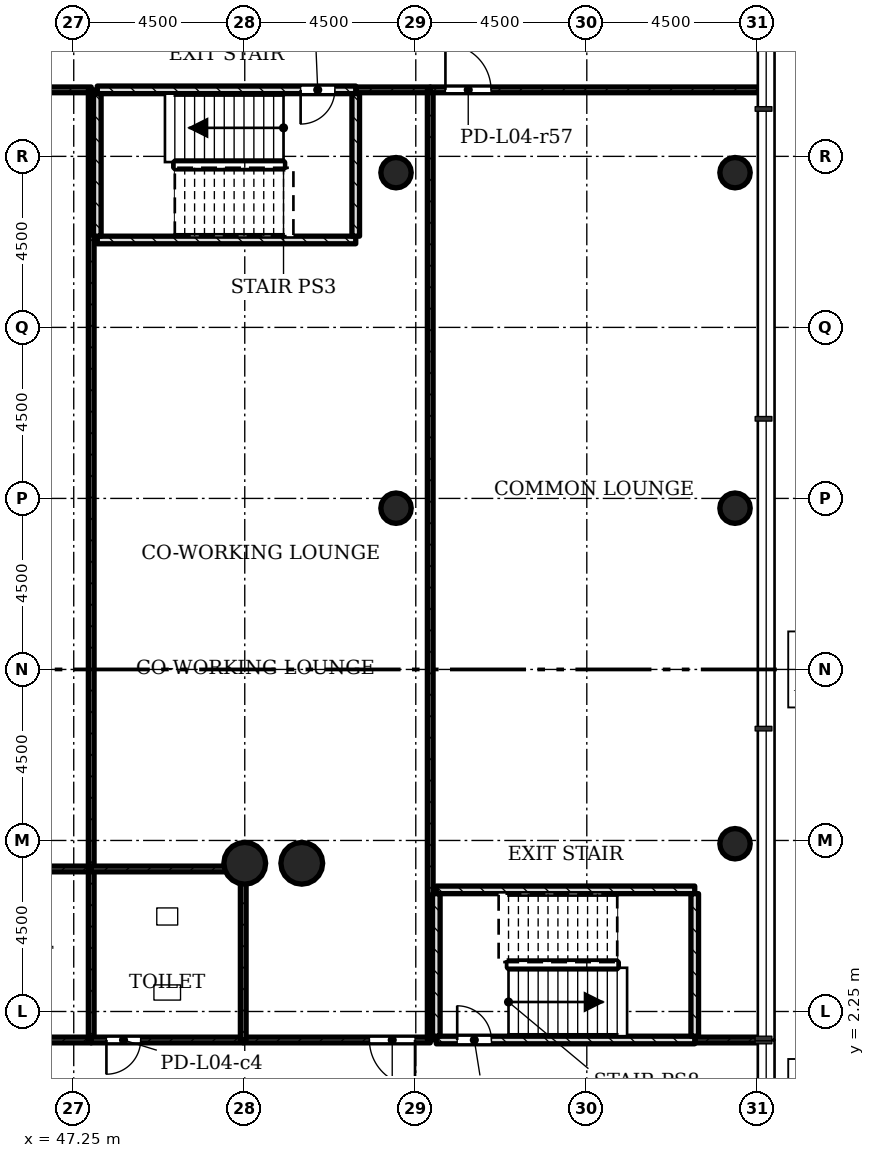
"""IFC4 building model, lengths in metres.
Left out: names, types, materials, properties, quantities, classifications, styles, units other than length and angle.
Written with IfcOpenShell. Run it as: python <this file> out.ifc"""

import sys

from ifc_helpers import new_model, si_unit, direction, frame, frame_2d, origin, origin_2d, place, context, subcontext, project, spatial, rectangle, hollow_circle, extrude, element, fill, save


model = new_model("IFC4")
c1 = context("Model", 3, precision=1e-05, world=origin(), true_north=direction((0.0, 1.0)))
c2 = subcontext(c1, "Body", "Model", "MODEL_VIEW")
j1 = project(units=[si_unit("LENGTHUNIT", "METRE"), si_unit("PLANEANGLEUNIT", "RADIAN")], contexts=[c1])
p1 = place(None, origin())
s1 = spatial("IfcSite", under=j1, at=p1, CompositionType="ELEMENT")
p2 = place(p1, origin())
s2 = spatial("IfcBuilding", under=s1, at=p2, CompositionType="ELEMENT")
p3 = place(p2, frame((0.0, 0.0, 20.0)))
s3 = spatial("IfcBuildingStorey", under=s2, at=p3, CompositionType="ELEMENT", Elevation=20.0)
for number, where, z_axis, x_axis in (
    (1, (51.75, 6.15, 0.0), (0.0, 0.0, 1.0), (1.0, 0.0, 0.0)),
    (2, (53.25, 6.15, 0.0), (0.0, 0.0, 1.0), (1.0, 0.0, 0.0)),
):
    element("IfcColumn", number, at=place(p3, frame(where, z_axis=z_axis, x_axis=x_axis)), inside=s3, PredefinedType="COLUMN", context=c2, shape_type="SweptSolid", body=[
        extrude(hollow_circle(Radius=0.55, WallThickness=0.04, at=origin_2d()), origin(), (0.0, 0.0, 1.0), 4.5),
    ])
for number, where, z_axis, x_axis in (
    (3, (64.65, 6.664, 0.0), (0.0, 0.0, 1.0), (1.0, 0.0, 0.0)),
    (4, (55.73, 15.493, 0.0), (0.0, 0.0, 1.0), (1.0, 0.0, 0.0)),
    (5, (64.65, 15.493, 0.0), (0.0, 0.0, 1.0), (1.0, 0.0, 0.0)),
    (6, (55.73, 24.321, 0.0), (0.0, 0.0, 1.0), (1.0, 0.0, 0.0)),
    (7, (64.65, 24.321, 0.0), (0.0, 0.0, 1.0), (1.0, 0.0, 0.0)),
):
    element("IfcColumn", number, at=place(p3, frame(where, z_axis=z_axis, x_axis=x_axis)), inside=s3, PredefinedType="COLUMN", context=c2, shape_type="SweptSolid", body=[
        extrude(hollow_circle(Radius=0.4, WallThickness=0.028, at=origin_2d()), origin(), (0.0, 0.0, 1.0), 4.08),
    ])
p4 = place(p3, frame((38.79, 26.5, 0.0), z_axis=(0.0, 0.0, 1.0), x_axis=(1.0, 0.0, 0.0)))
e8 = element("IfcWall", 8, at=p4, inside=s3, PredefinedType="PARTITIONING", context=c2, shape_type="SweptSolid", body=[
    extrude(rectangle(XDim=8.92, YDim=0.15, at=frame_2d((4.46, 0.0))), origin(), (0.0, 0.0, 1.0), 4.075),
])
p5 = place(p4, frame((0.4, 0.0, 0.0)))
e9 = element("IfcOpeningElement", 9, at=p5, cuts=e8, PredefinedType="OPENING", context=c2, shape_type="SweptSolid", body=[
    extrude(rectangle(XDim=1.2, YDim=2.1, at=frame_2d((0.6, 1.05))), frame((0.0, 0.085, 0.0), z_axis=(0.0, -1.0, 0.0), x_axis=(1.0, 0.0, 0.0)), (0.0, 0.0, 1.0), 0.17),
])
p6 = place(p3, frame((47.71, 26.5, 0.0), z_axis=(0.0, 0.0, 1.0), x_axis=(0.0, -1.0, 0.0)))
e10 = element("IfcWall", 10, at=p6, inside=s3, PredefinedType="PARTITIONING", context=c2, shape_type="SweptSolid", body=[
    extrude(rectangle(XDim=20.5, YDim=0.15, at=frame_2d((10.25, 0.0))), origin(), (0.0, 0.0, 1.0), 4.075),
])
p7 = place(p3, frame((54.67, 26.5, 0.0), z_axis=(0.0, 0.0, 1.0), x_axis=(1.0, 0.0, 0.0)))
e11 = element("IfcWall", 11, at=p7, inside=s3, PredefinedType="PARTITIONING", context=c2, shape_type="SweptSolid", body=[
    extrude(rectangle(XDim=1.96, YDim=0.15, at=frame_2d((0.98, 0.0))), origin(), (0.0, 0.0, 1.0), 4.075),
])
p8 = place(p3, frame((56.63, 1.5, 0.0), z_axis=(0.0, 0.0, 1.0), x_axis=(-1.0, 0.0, 0.0)))
e12 = element("IfcWall", 12, at=p8, inside=s3, PredefinedType="PARTITIONING", context=c2, shape_type="SweptSolid", body=[
    extrude(rectangle(XDim=4.92, YDim=0.15, at=frame_2d((2.46, 0.0))), origin(), (0.0, 0.0, 1.0), 4.075),
])
p9 = place(p8, frame((0.4, 0.0, 0.0)))
e13 = element("IfcOpeningElement", 13, at=p9, cuts=e12, PredefinedType="OPENING", context=c2, shape_type="SweptSolid", body=[
    extrude(rectangle(XDim=1.2, YDim=2.1, at=frame_2d((0.6, 1.05))), frame((0.0, 0.085, 0.0), z_axis=(0.0, -1.0, 0.0), x_axis=(1.0, 0.0, 0.0)), (0.0, 0.0, 1.0), 0.17),
])
p10 = place(p3, frame((56.63, 26.5, 0.0), z_axis=(0.0, 0.0, 1.0), x_axis=(0.0, -1.0, 0.0)))
e14 = element("IfcWall", 14, at=p10, inside=s3, PredefinedType="PARTITIONING", context=c2, shape_type="SweptSolid", body=[
    extrude(rectangle(XDim=25.0, YDim=0.15, at=frame_2d((12.5, 0.0))), origin(), (0.0, 0.0, 1.0), 4.075),
])
p11 = place(p3, frame((56.63, 26.5, 0.0), z_axis=(0.0, 0.0, 1.0), x_axis=(1.0, 0.0, 0.0)))
e15 = element("IfcWall", 15, at=p11, inside=s3, PredefinedType="PARTITIONING", context=c2, shape_type="SweptSolid", body=[
    extrude(rectangle(XDim=8.72, YDim=0.15, at=frame_2d((4.36, 0.0))), origin(), (0.0, 0.0, 1.0), 4.075),
])
p12 = place(p11, frame((0.4, 0.0, 0.0)))
e16 = element("IfcOpeningElement", 16, at=p12, cuts=e15, PredefinedType="OPENING", context=c2, shape_type="SweptSolid", body=[
    extrude(rectangle(XDim=1.2, YDim=2.1, at=frame_2d((0.6, 1.05))), frame((0.0, 0.085, 0.0), z_axis=(0.0, -1.0, 0.0), x_axis=(1.0, 0.0, 0.0)), (0.0, 0.0, 1.0), 0.17),
])
p13 = place(p3, frame((65.35, 1.5, 0.0), z_axis=(0.0, 0.0, 1.0), x_axis=(-1.0, 0.0, 0.0)))
e17 = element("IfcWall", 17, at=p13, inside=s3, PredefinedType="PARTITIONING", context=c2, shape_type="SweptSolid", body=[
    extrude(rectangle(XDim=1.76, YDim=0.15, at=frame_2d((0.88, 0.0))), origin(), (0.0, 0.0, 1.0), 4.075),
])
p14 = place(p3, frame((43.71, 1.5, 0.0), z_axis=(0.0, 0.0, 1.0), x_axis=(1.0, 0.0, 0.0)))
e18 = element("IfcWall", 18, at=p14, inside=s3, PredefinedType="PARTITIONING", context=c2, shape_type="SweptSolid", body=[
    extrude(rectangle(XDim=4.0, YDim=0.15, at=frame_2d((2.0, 0.0))), origin(), (0.0, 0.0, 1.0), 4.075),
])
p15 = place(p14, frame((0.4, 0.0, 0.0)))
e19 = element("IfcOpeningElement", 19, at=p15, cuts=e18, PredefinedType="OPENING", context=c2, shape_type="SweptSolid", body=[
    extrude(rectangle(XDim=0.9, YDim=2.1, at=frame_2d((0.45, 1.05))), frame((0.0, 0.085, 0.0), z_axis=(0.0, -1.0, 0.0), x_axis=(1.0, 0.0, 0.0)), (0.0, 0.0, 1.0), 0.17),
])
p16 = place(p3, frame((47.71, 6.0, 0.0), z_axis=(0.0, 0.0, 1.0), x_axis=(-1.0, 0.0, 0.0)))
e20 = element("IfcWall", 20, at=p16, inside=s3, PredefinedType="PARTITIONING", context=c2, shape_type="SweptSolid", body=[
    extrude(rectangle(XDim=4.0, YDim=0.15, at=frame_2d((2.0, 0.0))), origin(), (0.0, 0.0, 1.0), 4.075),
])
p17 = place(p3, frame((47.71, 1.5, 0.0), z_axis=(0.0, 0.0, 1.0), x_axis=(0.0, 1.0, 0.0)))
e21 = element("IfcWall", 21, at=p17, inside=s3, PredefinedType="PARTITIONING", context=c2, shape_type="SweptSolid", body=[
    extrude(rectangle(XDim=4.5, YDim=0.15, at=frame_2d((2.25, 0.0))), origin(), (0.0, 0.0, 1.0), 4.075),
])
p18 = place(p3, frame((47.71, 1.5, 0.0), z_axis=(0.0, 0.0, 1.0), x_axis=(1.0, 0.0, 0.0)))
e22 = element("IfcWall", 22, at=p18, inside=s3, PredefinedType="PARTITIONING", context=c2, shape_type="SweptSolid", body=[
    extrude(rectangle(XDim=4.0, YDim=0.15, at=frame_2d((2.0, 0.0))), origin(), (0.0, 0.0, 1.0), 4.075),
])
p19 = place(p18, frame((0.4, 0.0, 0.0)))
e23 = element("IfcOpeningElement", 23, at=p19, cuts=e22, PredefinedType="OPENING", context=c2, shape_type="SweptSolid", body=[
    extrude(rectangle(XDim=0.9, YDim=2.1, at=frame_2d((0.45, 1.05))), frame((0.0, 0.085, 0.0), z_axis=(0.0, -1.0, 0.0), x_axis=(1.0, 0.0, 0.0)), (0.0, 0.0, 1.0), 0.17),
])
p20 = place(p3, frame((51.71, 1.5, 0.0), z_axis=(0.0, 0.0, 1.0), x_axis=(0.0, 1.0, 0.0)))
e24 = element("IfcWall", 24, at=p20, inside=s3, PredefinedType="PARTITIONING", context=c2, shape_type="SweptSolid", body=[
    extrude(rectangle(XDim=4.5, YDim=0.15, at=frame_2d((2.25, 0.0))), origin(), (0.0, 0.0, 1.0), 4.075),
])
p21 = place(p3, frame((51.71, 6.0, 0.0), z_axis=(0.0, 0.0, 1.0), x_axis=(-1.0, 0.0, 0.0)))
e25 = element("IfcWall", 25, at=p21, inside=s3, PredefinedType="PARTITIONING", context=c2, shape_type="SweptSolid", body=[
    extrude(rectangle(XDim=4.0, YDim=0.15, at=frame_2d((2.0, 0.0))), origin(), (0.0, 0.0, 1.0), 4.075),
])
p22 = place(p3, frame((47.87, 26.5, 0.0), z_axis=(0.0, 0.0, 1.0), x_axis=(1.0, 0.0, 0.0)))
e26 = element("IfcWall", 26, at=p22, inside=s3, PredefinedType="SHEAR", context=c2, shape_type="SweptSolid", body=[
    extrude(rectangle(XDim=6.8, YDim=0.2, at=frame_2d((3.4, 0.0))), origin(), (0.0, 0.0, 1.0), 4.075),
])
p23 = place(p22, frame((5.35, 0.0, 0.0)))
e27 = element("IfcOpeningElement", 27, at=p23, cuts=e26, PredefinedType="OPENING", context=c2, shape_type="SweptSolid", body=[
    extrude(rectangle(XDim=0.9, YDim=2.1, at=frame_2d((0.45, 1.05))), frame((0.0, 0.11, 0.0), z_axis=(0.0, -1.0, 0.0), x_axis=(1.0, 0.0, 0.0)), (0.0, 0.0, 1.0), 0.22),
])
p24 = place(p3, frame((47.87, 22.55, 0.0), z_axis=(0.0, 0.0, 1.0), x_axis=(1.0, 0.0, 0.0)))
e28 = element("IfcWall", 28, at=p24, inside=s3, PredefinedType="SHEAR", context=c2, shape_type="SweptSolid", body=[
    extrude(rectangle(XDim=6.8, YDim=0.2, at=frame_2d((3.4, 0.0))), origin(), (0.0, 0.0, 1.0), 4.075),
])
for number, where, z_axis, x_axis in (
    (29, (47.87, 22.65, 0.0), (0.0, 0.0, 1.0), (0.0, 1.0, 0.0)),
    (30, (54.67, 22.65, 0.0), (0.0, 0.0, 1.0), (0.0, 1.0, 0.0)),
):
    element("IfcWall", number, at=place(p3, frame(where, z_axis=z_axis, x_axis=x_axis)), inside=s3, PredefinedType="SHEAR", context=c2, shape_type="SweptSolid", body=[
        extrude(rectangle(XDim=3.75, YDim=0.2, at=frame_2d((1.875, 0.0))), origin(), (0.0, 0.0, 1.0), 4.075),
    ])
p25 = place(p3, frame((56.79, 1.5, 0.0), z_axis=(0.0, 0.0, 1.0), x_axis=(1.0, 0.0, 0.0)))
e31 = element("IfcWall", 31, at=p25, inside=s3, PredefinedType="SHEAR", context=c2, shape_type="SweptSolid", body=[
    extrude(rectangle(XDim=6.8, YDim=0.2, at=frame_2d((3.4, 0.0))), origin(), (0.0, 0.0, 1.0), 4.075),
])
p26 = place(p25, frame((0.55, 0.0, 0.0)))
e32 = element("IfcOpeningElement", 32, at=p26, cuts=e31, PredefinedType="OPENING", context=c2, shape_type="SweptSolid", body=[
    extrude(rectangle(XDim=0.9, YDim=2.1, at=frame_2d((0.45, 1.05))), frame((0.0, 0.11, 0.0), z_axis=(0.0, -1.0, 0.0), x_axis=(1.0, 0.0, 0.0)), (0.0, 0.0, 1.0), 0.22),
])
p27 = place(p3, frame((56.79, 5.45, 0.0), z_axis=(0.0, 0.0, 1.0), x_axis=(1.0, 0.0, 0.0)))
e33 = element("IfcWall", 33, at=p27, inside=s3, PredefinedType="SHEAR", context=c2, shape_type="SweptSolid", body=[
    extrude(rectangle(XDim=6.8, YDim=0.2, at=frame_2d((3.4, 0.0))), origin(), (0.0, 0.0, 1.0), 4.075),
])
for number, where, z_axis, x_axis in (
    (34, (56.79, 1.6, 0.0), (0.0, 0.0, 1.0), (0.0, 1.0, 0.0)),
    (35, (63.59, 1.6, 0.0), (0.0, 0.0, 1.0), (0.0, 1.0, 0.0)),
):
    element("IfcWall", number, at=place(p3, frame(where, z_axis=z_axis, x_axis=x_axis)), inside=s3, PredefinedType="SHEAR", context=c2, shape_type="SweptSolid", body=[
        extrude(rectangle(XDim=3.75, YDim=0.2, at=frame_2d((1.875, 0.0))), origin(), (0.0, 0.0, 1.0), 4.075),
    ])
p28 = place(p9, origin())
e36 = element("IfcDoor", 36, at=p28, inside=s3, OperationType="SINGLE_SWING_RIGHT", PredefinedType="DOOR", context=c2, shape_type="SweptSolid", body=[
    extrude(rectangle(XDim=1.2, YDim=2.1, at=frame_2d((0.6, 1.05))), frame((0.0, 0.025, 0.0), z_axis=(0.0, -1.0, 0.0), x_axis=(1.0, 0.0, 0.0)), (0.0, 0.0, 1.0), 0.05),
])
fill(e13, e36)
p29 = place(p12, origin())
e37 = element("IfcDoor", 37, at=p29, inside=s3, OperationType="SINGLE_SWING_RIGHT", PredefinedType="DOOR", context=c2, shape_type="SweptSolid", body=[
    extrude(rectangle(XDim=1.2, YDim=2.1, at=frame_2d((0.6, 1.05))), frame((0.0, 0.025, 0.0), z_axis=(0.0, -1.0, 0.0), x_axis=(1.0, 0.0, 0.0)), (0.0, 0.0, 1.0), 0.05),
])
fill(e16, e37)
p30 = place(p19, origin())
e38 = element("IfcDoor", 38, at=p30, inside=s3, OperationType="SINGLE_SWING_LEFT", PredefinedType="DOOR", context=c2, shape_type="SweptSolid", body=[
    extrude(rectangle(XDim=0.9, YDim=2.1, at=frame_2d((0.45, 1.05))), frame((0.0, 0.025, 0.0), z_axis=(0.0, -1.0, 0.0), x_axis=(1.0, 0.0, 0.0)), (0.0, 0.0, 1.0), 0.05),
])
fill(e23, e38)
p31 = place(p23, origin())
e39 = element("IfcDoor", 39, at=p31, inside=s3, OperationType="SINGLE_SWING_LEFT", PredefinedType="DOOR", context=c2, shape_type="SweptSolid", body=[
    extrude(rectangle(XDim=0.9, YDim=2.1, at=frame_2d((0.45, 1.05))), frame((0.0, 0.025, 0.0), z_axis=(0.0, -1.0, 0.0), x_axis=(1.0, 0.0, 0.0)), (0.0, 0.0, 1.0), 0.05),
])
fill(e27, e39)
p32 = place(p26, origin())
e40 = element("IfcDoor", 40, at=p32, inside=s3, OperationType="SINGLE_SWING_RIGHT", PredefinedType="DOOR", context=c2, shape_type="SweptSolid", body=[
    extrude(rectangle(XDim=0.9, YDim=2.1, at=frame_2d((0.45, 1.05))), frame((0.0, 0.025, 0.0), z_axis=(0.0, -1.0, 0.0), x_axis=(1.0, 0.0, 0.0)), (0.0, 0.0, 1.0), 0.05),
])
fill(e32, e40)
save(model, sys.argv[1])
